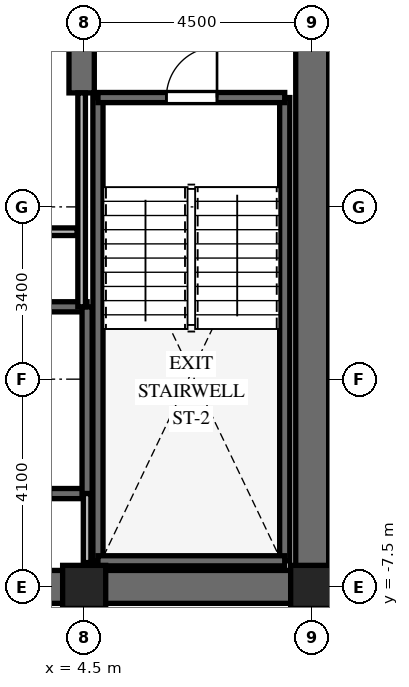
"""IFC4 building model, lengths in metres.
Left out: names, types, materials, properties, quantities, classifications, styles, units other than length and angle.
Written with IfcOpenShell. Run it as: python <this file> out.ifc"""

import sys

from ifc_helpers import new_model, si_unit, direction, frame, frame_2d, origin, origin_2d, place, context, subcontext, project, spatial, rectangle, extrude, element, fill, save


model = new_model("IFC4")
c1 = context("Model", 3, precision=1e-05, world=origin(), true_north=direction((0.0, 1.0)))
c2 = subcontext(c1, "Body", "Model", "MODEL_VIEW")
j1 = project(units=[si_unit("LENGTHUNIT", "METRE"), si_unit("PLANEANGLEUNIT", "RADIAN")], contexts=[c1])
p1 = place(None, origin())
s1 = spatial("IfcSite", under=j1, at=p1, CompositionType="ELEMENT")
p2 = place(p1, origin())
s2 = spatial("IfcBuilding", under=s1, at=p2, CompositionType="ELEMENT")
p3 = place(p2, frame((0.0, 0.0, 284.7)))
s3 = spatial("IfcBuildingStorey", under=s2, at=p3, CompositionType="ELEMENT", Elevation=284.7)
p4 = place(p3, frame((-9.325, -7.5, 0.0), z_axis=(0.0, 0.0, 1.0), x_axis=(1.0, 0.0, 0.0)))
e1 = element("IfcWall", 1, at=p4, inside=s3, PredefinedType="SHEAR", context=c2, shape_type="SweptSolid", body=[
    extrude(rectangle(XDim=18.65, YDim=0.65, at=frame_2d((9.325, 0.0))), origin(), (0.0, 0.0, 1.0), 3.9),
])
p5 = place(p4, frame((9.375, 0.0, 0.0)))
e2 = element("IfcOpeningElement", 2, at=p5, cuts=e1, PredefinedType="OPENING", context=c2, shape_type="SweptSolid", body=[
    extrude(rectangle(XDim=1.0, YDim=2.15, at=frame_2d((0.5, 1.075))), frame((0.0, 0.335, 0.0), z_axis=(0.0, -1.0, 0.0), x_axis=(1.0, 0.0, 0.0)), (0.0, 0.0, 1.0), 0.67),
])
p6 = place(p3, frame((9.0, -7.175, 0.0), z_axis=(0.0, 0.0, 1.0), x_axis=(0.0, 1.0, 0.0)))
e3 = element("IfcWall", 3, at=p6, inside=s3, PredefinedType="SHEAR", context=c2, shape_type="SweptSolid", body=[
    extrude(rectangle(XDim=14.35, YDim=0.65, at=frame_2d((7.175, 0.0))), origin(), (0.0, 0.0, 1.0), 3.9),
])
p7 = place(p6, frame((10.3, 0.0, 0.0)))
e4 = element("IfcOpeningElement", 4, at=p7, cuts=e3, PredefinedType="OPENING", context=c2, shape_type="SweptSolid", body=[
    extrude(rectangle(XDim=1.05, YDim=2.15, at=frame_2d((0.525, 1.075))), frame((0.0, 0.335, 0.0), z_axis=(0.0, -1.0, 0.0), x_axis=(1.0, 0.0, 0.0)), (0.0, 0.0, 1.0), 0.67),
])
p8 = place(p3, frame((4.45, 2.25, 0.0), z_axis=(0.0, 0.0, 1.0), x_axis=(0.0, 1.0, 0.0)))
e5 = element("IfcWall", 5, at=p8, inside=s3, PredefinedType="SHEAR", context=c2, shape_type="SweptSolid", body=[
    extrude(rectangle(XDim=4.925, YDim=0.5, at=frame_2d((2.462, 0.0))), origin(), (0.0, 0.0, 1.0), 3.9),
])
for number, where, z_axis, x_axis in (
    (6, (4.772, -6.985, 0.0), (0.0, 0.0, 1.0), (0.0, 1.0, 0.0)),
    (7, (8.458, -6.985, 0.0), (0.0, 0.0, 1.0), (0.0, 1.0, 0.0)),
):
    element("IfcWall", number, at=place(p3, frame(where, z_axis=z_axis, x_axis=x_axis)), inside=s3, PredefinedType="SHEAR", context=c2, shape_type="SweptSolid", body=[
        extrude(rectangle(XDim=9.143, YDim=0.2, at=frame_2d((4.572, 0.0))), origin(), (0.0, 0.0, 1.0), 3.9),
    ])
p9 = place(p3, frame((4.772, -6.985, 0.0), z_axis=(0.0, 0.0, 1.0), x_axis=(1.0, 0.0, 0.0)))
e8 = element("IfcWall", 8, at=p9, inside=s3, PredefinedType="SHEAR", context=c2, shape_type="SweptSolid", body=[
    extrude(rectangle(XDim=3.686, YDim=0.2, at=frame_2d((1.843, 0.0))), origin(), (0.0, 0.0, 1.0), 3.9),
])
p10 = place(p3, frame((4.772, 2.158, 0.0), z_axis=(0.0, 0.0, 1.0), x_axis=(1.0, 0.0, 0.0)))
e9 = element("IfcWall", 9, at=p10, inside=s3, PredefinedType="SHEAR", context=c2, shape_type="SweptSolid", body=[
    extrude(rectangle(XDim=3.686, YDim=0.2, at=frame_2d((1.843, 0.0))), origin(), (0.0, 0.0, 1.0), 3.9),
])
p11 = place(p10, frame((1.35, 0.0, 0.0)))
e10 = element("IfcOpeningElement", 10, at=p11, cuts=e9, PredefinedType="OPENING", context=c2, shape_type="SweptSolid", body=[
    extrude(rectangle(XDim=1.0, YDim=2.15, at=frame_2d((0.5, 1.075))), frame((0.0, 0.11, 0.0), z_axis=(0.0, -1.0, 0.0), x_axis=(1.0, 0.0, 0.0)), (0.0, 0.0, 1.0), 0.22),
])
p12 = place(p3, frame((-4.608, -5.658, 0.0), z_axis=(0.0, 0.0, 1.0), x_axis=(1.0, 0.0, 0.0)))
e11 = element("IfcWall", 11, at=p12, inside=s3, PredefinedType="SHEAR", context=c2, shape_type="SweptSolid", body=[
    extrude(rectangle(XDim=9.166, YDim=0.2, at=frame_2d((4.583, 0.0))), origin(), (0.0, 0.0, 1.0), 3.9),
])
p13 = place(p12, frame((7.45, 0.0, 0.0)))
e12 = element("IfcOpeningElement", 12, at=p13, cuts=e11, PredefinedType="OPENING", context=c2, shape_type="SweptSolid", body=[
    extrude(rectangle(XDim=1.0, YDim=2.15, at=frame_2d((0.5, 1.075))), frame((0.0, 0.11, 0.0), z_axis=(0.0, -1.0, 0.0), x_axis=(1.0, 0.0, 0.0)), (0.0, 0.0, 1.0), 0.22),
])
p14 = place(p3, frame((-4.608, -1.972, 0.0), z_axis=(0.0, 0.0, 1.0), x_axis=(1.0, 0.0, 0.0)))
e13 = element("IfcWall", 13, at=p14, inside=s3, PredefinedType="SHEAR", context=c2, shape_type="SweptSolid", body=[
    extrude(rectangle(XDim=9.166, YDim=0.2, at=frame_2d((4.583, 0.0))), origin(), (0.0, 0.0, 1.0), 3.9),
])
p15 = place(p3, frame((4.558, -5.658, 0.0), z_axis=(0.0, 0.0, 1.0), x_axis=(0.0, 1.0, 0.0)))
e14 = element("IfcWall", 14, at=p15, inside=s3, PredefinedType="SHEAR", context=c2, shape_type="SweptSolid", body=[
    extrude(rectangle(XDim=3.686, YDim=0.2, at=frame_2d((1.843, 0.0))), origin(), (0.0, 0.0, 1.0), 3.9),
])
for number, where, z_axis, x_axis in (
    (15, (4.5, -7.5, 0.0), (0.0, 0.0, 1.0), (1.0, 0.0, 0.0)),
    (16, (9.0, -7.5, 0.0), (0.0, 0.0, 1.0), (1.0, 0.0, 0.0)),
):
    element("IfcColumn", number, at=place(p3, frame(where, z_axis=z_axis, x_axis=x_axis)), inside=s3, PredefinedType="COLUMN", context=c2, shape_type="SweptSolid", body=[
        extrude(rectangle(XDim=0.85, YDim=0.85, at=origin_2d()), origin(), (0.0, 0.0, 1.0), 3.9),
    ])
p16 = place(p3, frame((4.558, -7.02, 0.0), z_axis=(0.0, 0.0, 1.0), x_axis=(0.0, 1.0, 0.0)))
e17 = element("IfcWall", 17, at=p16, inside=s3, PredefinedType="PARTITIONING", context=c2, shape_type="SweptSolid", body=[
    extrude(rectangle(XDim=1.362, YDim=0.15, at=frame_2d((0.681, 0.0))), origin(), (0.0, 0.0, 1.0), 3.58),
])
p17 = place(p3, frame((4.45, -1.972, 0.0), z_axis=(0.0, 0.0, 1.0), x_axis=(0.0, 1.0, 0.0)))
e18 = element("IfcWall", 18, at=p17, inside=s3, PredefinedType="PARTITIONING", context=c2, shape_type="SweptSolid", body=[
    extrude(rectangle(XDim=4.222, YDim=0.15, at=frame_2d((2.111, 0.0))), origin(), (0.0, 0.0, 1.0), 3.58),
])
p18 = place(p3, frame((-4.36, -0.49, 0.0), z_axis=(0.0, 0.0, 1.0), x_axis=(1.0, 0.0, 0.0)))
e19 = element("IfcWall", 19, at=p18, inside=s3, PredefinedType="PARTITIONING", context=c2, shape_type="SweptSolid", body=[
    extrude(rectangle(XDim=8.72, YDim=0.15, at=frame_2d((4.36, 0.0))), origin(), (0.0, 0.0, 1.0), 3.58),
])
p19 = place(p18, frame((3.16, 0.0, 0.0)))
e20 = element("IfcOpeningElement", 20, at=p19, cuts=e19, PredefinedType="OPENING", context=c2, shape_type="SweptSolid", body=[
    extrude(rectangle(XDim=0.85, YDim=2.03, at=frame_2d((0.425, 1.015))), frame((0.0, 0.085, 0.0), z_axis=(0.0, -1.0, 0.0), x_axis=(1.0, 0.0, 0.0)), (0.0, 0.0, 1.0), 0.17),
])
p20 = place(p18, frame((5.21, 0.0, 0.0)))
e21 = element("IfcOpeningElement", 21, at=p20, cuts=e19, PredefinedType="OPENING", context=c2, shape_type="SweptSolid", body=[
    extrude(rectangle(XDim=0.85, YDim=2.03, at=frame_2d((0.425, 1.015))), frame((0.0, 0.085, 0.0), z_axis=(0.0, -1.0, 0.0), x_axis=(1.0, 0.0, 0.0)), (0.0, 0.0, 1.0), 0.17),
])
p21 = place(p11, origin())
e22 = element("IfcDoor", 22, at=p21, inside=s3, OperationType="SINGLE_SWING_RIGHT", PredefinedType="DOOR", context=c2, shape_type="SweptSolid", body=[
    extrude(rectangle(XDim=1.0, YDim=2.15, at=frame_2d((0.5, 1.075))), frame((0.0, 0.025, 0.0), z_axis=(0.0, -1.0, 0.0), x_axis=(1.0, 0.0, 0.0)), (0.0, 0.0, 1.0), 0.05),
])
fill(e10, e22)
save(model, sys.argv[1])
